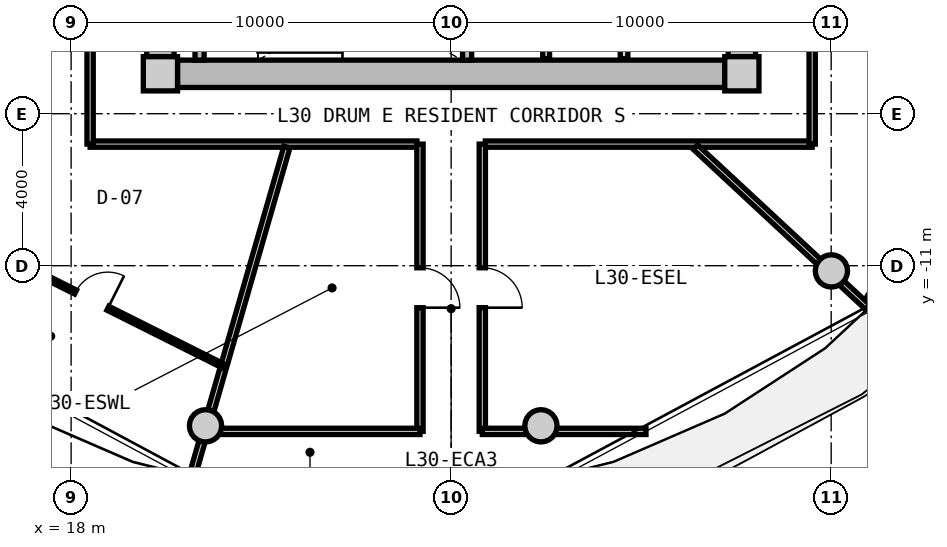
"""IFC4 building model, lengths in metres.
Left out: names, types, materials, properties, quantities, classifications, styles, units other than length and angle.
Written with IfcOpenShell. Run it as: python <this file> out.ifc"""

import sys

from ifc_helpers import new_model, si_unit, direction, frame, frame_2d, origin, origin_2d, place, context, subcontext, project, spatial, rectangle, circle, extrude, source, transform, mapped, element, fill, save


model = new_model("IFC4")
c1 = context("Model", 3, precision=1e-05, world=origin(), true_north=direction((0.0, 1.0)))
c2 = subcontext(c1, "Body", "Model", "MODEL_VIEW")
j1 = project(units=[si_unit("LENGTHUNIT", "METRE"), si_unit("PLANEANGLEUNIT", "RADIAN")], contexts=[c1])
p1 = place(None, origin())
s1 = spatial("IfcSite", under=j1, at=p1, CompositionType="ELEMENT")
p2 = place(p1, origin())
s2 = spatial("IfcBuilding", under=s1, at=p2, CompositionType="ELEMENT")
p3 = place(p2, frame((0.0, 0.0, 99.3)))
s3 = spatial("IfcBuildingStorey", under=s2, at=p3, CompositionType="ELEMENT", Elevation=99.3)
m1 = source(origin(), c2, "Body", "SweptSolid", [
    extrude(rectangle(XDim=0.9, YDim=0.9, at=origin_2d()), origin(), (0.0, 0.0, 1.0), 3.05),
])
for number, where, z_axis, x_axis in (
    (1, (20.35, -5.95, 0.0), (0.0, 0.0, 1.0), (1.0, 0.0, 0.0)),
    (2, (35.65, -5.95, 0.0), (0.0, 0.0, 1.0), (1.0, 0.0, 0.0)),
):
    element("IfcColumn", number, at=place(p3, frame(where, z_axis=z_axis, x_axis=x_axis)), inside=s3, PredefinedType="COLUMN", context=c2, shape_type="MappedRepresentation", body=[
        mapped(m1, transform((0.0, 0.0, 0.0), x_axis=(1.0, 0.0, 0.0), y_axis=(0.0, 1.0, 0.0), z_axis=(0.0, 0.0, 1.0), scale=1.0)),
    ])
m2 = source(origin(), c2, "Body", "SweptSolid", [
    extrude(rectangle(XDim=14.4, YDim=0.72, at=frame_2d((7.2, 0.0))), origin(), (0.0, 0.0, 1.0), 2.79),
])
p4 = place(p3, frame((35.2, -5.95, 0.0), z_axis=(0.0, 0.0, 1.0), x_axis=(-1.0, 0.0, 0.0)))
e3 = element("IfcWall", 3, at=p4, inside=s3, PredefinedType="SHEAR", context=c2, shape_type="MappedRepresentation", body=[
    mapped(m2, transform((0.0, 0.0, 0.0), x_axis=(1.0, 0.0, 0.0), y_axis=(0.0, 1.0, 0.0), z_axis=(0.0, 0.0, 1.0), scale=1.0)),
])
m3 = source(origin(), c2, "Body", "SweptSolid", [
    extrude(rectangle(XDim=11.0, YDim=0.72, at=frame_2d((5.5, 0.0))), origin(), (0.0, 0.0, 1.0), 2.79),
])
p5 = place(p3, frame((20.35, -5.5, 0.0), z_axis=(0.0, 0.0, 1.0), x_axis=(0.0, 1.0, 0.0)))
e4 = element("IfcWall", 4, at=p5, inside=s3, PredefinedType="SHEAR", context=c2, shape_type="MappedRepresentation", body=[
    mapped(m3, transform((0.0, 0.0, 0.0), x_axis=(1.0, 0.0, 0.0), y_axis=(0.0, 1.0, 0.0), z_axis=(0.0, 0.0, 1.0), scale=1.0)),
])
p6 = place(p5, frame((3.8, 0.0, 0.0)))
e5 = element("IfcOpeningElement", 5, at=p6, cuts=e4, PredefinedType="OPENING", context=c2, shape_type="SweptSolid", body=[
    extrude(rectangle(XDim=1.2, YDim=2.15, at=frame_2d((0.6, 1.075))), frame((0.0, 0.37, 0.0), z_axis=(0.0, -1.0, 0.0), x_axis=(1.0, 0.0, 0.0)), (0.0, 0.0, 1.0), 0.74),
])
p7 = place(p3, frame((35.65, 5.5, 0.0), z_axis=(0.0, 0.0, 1.0), x_axis=(0.0, -1.0, 0.0)))
e6 = element("IfcWall", 6, at=p7, inside=s3, PredefinedType="SHEAR", context=c2, shape_type="MappedRepresentation", body=[
    mapped(m3, transform((0.0, 0.0, 0.0), x_axis=(1.0, 0.0, 0.0), y_axis=(0.0, 1.0, 0.0), z_axis=(0.0, 0.0, 1.0), scale=1.0)),
])
p8 = place(p7, frame((5.65, 0.0, 0.0)))
e7 = element("IfcOpeningElement", 7, at=p8, cuts=e6, PredefinedType="OPENING", context=c2, shape_type="SweptSolid", body=[
    extrude(rectangle(XDim=1.2, YDim=2.15, at=frame_2d((0.6, 1.075))), frame((0.0, 0.37, 0.0), z_axis=(0.0, -1.0, 0.0), x_axis=(1.0, 0.0, 0.0)), (0.0, 0.0, 1.0), 0.74),
])
m4 = source(origin(), c2, "Body", "SweptSolid", [
    extrude(circle(Radius=0.425, at=origin_2d()), origin(), (0.0, 0.0, 1.0), 3.05),
])
for number, where, z_axis, x_axis in (
    (8, (21.537, -15.213, 0.0), (0.0, 0.0, 1.0), (1.0, 0.0, 0.0)),
    (9, (30.363, -15.213, 0.0), (0.0, 0.0, 1.0), (1.0, 0.0, 0.0)),
    (10, (38.006, -11.137, 0.0), (0.0, 0.0, 1.0), (1.0, 0.0, 0.0)),
):
    element("IfcColumn", number, at=place(p3, frame(where, z_axis=z_axis, x_axis=x_axis)), inside=s3, PredefinedType="COLUMN", context=c2, shape_type="MappedRepresentation", body=[
        mapped(m4, transform((0.0, 0.0, 0.0), x_axis=(1.0, 0.0, 0.0), y_axis=(0.0, 1.0, 0.0), z_axis=(0.0, 0.0, 1.0), scale=1.0)),
    ])
m5 = source(origin(), c2, "Body", "SweptSolid", [
    extrude(rectangle(XDim=9.014, YDim=0.29, at=frame_2d((4.507, 0.0))), origin(), (0.0, 0.0, 1.0), 2.79),
])
p9 = place(p3, frame((43.704, -4.421, 0.0), z_axis=(0.0, 0.0, 1.0), x_axis=(-0.527732945084, -0.849410347637, 0.0)))
e11 = element("IfcWall", 11, at=p9, inside=s3, PredefinedType="SOLIDWALL", context=c2, shape_type="MappedRepresentation", body=[
    mapped(m5, transform((0.0, 0.0, 0.0), x_axis=(1.0, 0.0, 0.0), y_axis=(0.0, 1.0, 0.0), z_axis=(0.0, 0.0, 1.0), scale=1.0)),
])
p10 = place(p9, frame((0.98, 0.0, 0.0)))
e12 = element("IfcOpeningElement", 12, at=p10, cuts=e11, PredefinedType="OPENING", context=c2, shape_type="SweptSolid", body=[
    extrude(rectangle(XDim=1.15, YDim=2.25, at=frame_2d((0.575, 1.125))), frame((0.0, 0.155, 0.0), z_axis=(0.0, -1.0, 0.0), x_axis=(1.0, 0.0, 0.0)), (0.0, 0.0, 1.0), 0.31),
])
p11 = place(p9, frame((4.857, 0.0, 0.85)))
e13 = element("IfcOpeningElement", 13, at=p11, cuts=e11, PredefinedType="OPENING", context=c2, shape_type="SweptSolid", body=[
    extrude(rectangle(XDim=1.2, YDim=1.5, at=frame_2d((0.6, 0.75))), frame((0.0, 0.155, 0.0), z_axis=(0.0, -1.0, 0.0), x_axis=(1.0, 0.0, 0.0)), (0.0, 0.0, 1.0), 0.31),
])
m6 = source(origin(), c2, "Body", "SweptSolid", [
    extrude(rectangle(XDim=3.14, YDim=0.24, at=frame_2d((1.57, 0.0))), origin(), (0.0, 0.0, 1.0), 2.79),
])
for number, where, z_axis, x_axis in (
    (14, (21.38, -5.59, 0.0), (0.0, 0.0, 1.0), (0.0, 1.0, 0.0)),
    (15, (28.42, -5.59, 0.0), (0.0, 0.0, 1.0), (0.0, 1.0, 0.0)),
):
    element("IfcWall", number, at=place(p3, frame(where, z_axis=z_axis, x_axis=x_axis)), inside=s3, PredefinedType="PARTITIONING", context=c2, shape_type="MappedRepresentation", body=[
        mapped(m6, transform((0.0, 0.0, 0.0), x_axis=(1.0, 0.0, 0.0), y_axis=(0.0, 1.0, 0.0), z_axis=(0.0, 0.0, 1.0), scale=1.0)),
    ])
m7 = source(origin(), c2, "Body", "SweptSolid", [
    extrude(rectangle(XDim=3.8, YDim=0.2, at=frame_2d((1.9, 0.0))), origin(), (0.0, 0.0, 1.0), 2.775),
])
p12 = place(p3, frame((32.55, -5.55, 0.0), z_axis=(0.0, 0.0, 1.0), x_axis=(0.0, 1.0, 0.0)))
e16 = element("IfcWall", 16, at=p12, inside=s3, PredefinedType="PARTITIONING", context=c2, shape_type="MappedRepresentation", body=[
    mapped(m7, transform((0.0, 0.0, 0.0), x_axis=(1.0, 0.0, 0.0), y_axis=(0.0, 1.0, 0.0), z_axis=(0.0, 0.0, 1.0), scale=1.0)),
])
m8 = source(origin(), c2, "Body", "SweptSolid", [
    extrude(rectangle(XDim=3.22, YDim=0.18, at=frame_2d((1.61, 0.0))), origin(), (0.0, 0.0, 1.0), 2.775),
])
p13 = place(p3, frame((30.5, -5.55, 0.0), z_axis=(0.0, 0.0, 1.0), x_axis=(0.0, 1.0, 0.0)))
e17 = element("IfcWall", 17, at=p13, inside=s3, PredefinedType="PARTITIONING", context=c2, shape_type="MappedRepresentation", body=[
    mapped(m8, transform((0.0, 0.0, 0.0), x_axis=(1.0, 0.0, 0.0), y_axis=(0.0, 1.0, 0.0), z_axis=(0.0, 0.0, 1.0), scale=1.0)),
])
m9 = source(origin(), c2, "Body", "SweptSolid", [
    extrude(rectangle(XDim=8.6, YDim=0.165, at=frame_2d((4.3, 0.0))), origin(), (0.0, 0.0, 1.0), 2.775),
])
for number, where, z_axis, x_axis in (
    (18, (37.5, -7.8, 0.0), (0.0, 0.0, 1.0), (-1.0, 0.0, 0.0)),
    (19, (27.1, -7.8, 0.0), (0.0, 0.0, 1.0), (-1.0, 0.0, 0.0)),
):
    element("IfcWall", number, at=place(p3, frame(where, z_axis=z_axis, x_axis=x_axis)), inside=s3, PredefinedType="PARTITIONING", context=c2, shape_type="MappedRepresentation", body=[
        mapped(m9, transform((0.0, 0.0, 0.0), x_axis=(1.0, 0.0, 0.0), y_axis=(0.0, 1.0, 0.0), z_axis=(0.0, 0.0, 1.0), scale=1.0)),
    ])
m10 = source(origin(), c2, "Body", "SweptSolid", [
    extrude(rectangle(XDim=15.6, YDim=0.165, at=frame_2d((7.8, 0.0))), origin(), (0.0, 0.0, 1.0), 2.775),
])
p14 = place(p3, frame((18.5, -7.8, 0.0), z_axis=(0.0, 0.0, 1.0), x_axis=(0.0, 1.0, 0.0)))
e20 = element("IfcWall", 20, at=p14, inside=s3, PredefinedType="PARTITIONING", context=c2, shape_type="MappedRepresentation", body=[
    mapped(m10, transform((0.0, 0.0, 0.0), x_axis=(1.0, 0.0, 0.0), y_axis=(0.0, 1.0, 0.0), z_axis=(0.0, 0.0, 1.0), scale=1.0)),
])
p15 = place(p14, frame((5.673, 0.0, 0.0)))
e21 = element("IfcOpeningElement", 21, at=p15, cuts=e20, PredefinedType="OPENING", context=c2, shape_type="SweptSolid", body=[
    extrude(rectangle(XDim=1.05, YDim=2.15, at=frame_2d((0.525, 1.075))), frame((0.0, 0.093, 0.0), z_axis=(0.0, -1.0, 0.0), x_axis=(1.0, 0.0, 0.0)), (0.0, 0.0, 1.0), 0.185),
])
p16 = place(p3, frame((37.5, 7.8, 0.0), z_axis=(0.0, 0.0, 1.0), x_axis=(0.0, -1.0, 0.0)))
e22 = element("IfcWall", 22, at=p16, inside=s3, PredefinedType="PARTITIONING", context=c2, shape_type="MappedRepresentation", body=[
    mapped(m10, transform((0.0, 0.0, 0.0), x_axis=(1.0, 0.0, 0.0), y_axis=(0.0, 1.0, 0.0), z_axis=(0.0, 0.0, 1.0), scale=1.0)),
])
p17 = place(p16, frame((9.482, 0.0, 0.0)))
e23 = element("IfcOpeningElement", 23, at=p17, cuts=e22, PredefinedType="OPENING", context=c2, shape_type="SweptSolid", body=[
    extrude(rectangle(XDim=1.25, YDim=2.2, at=frame_2d((0.625, 1.1))), frame((0.0, 0.093, 0.0), z_axis=(0.0, -1.0, 0.0), x_axis=(1.0, 0.0, 0.0)), (0.0, 0.0, 1.0), 0.185),
])
m11 = source(origin(), c2, "Body", "SweptSolid", [
    extrude(rectangle(XDim=8.989, YDim=0.165, at=frame_2d((4.495, 0.0))), origin(), (0.0, 0.0, 1.0), 2.275),
])
p18 = place(p3, frame((23.678, -7.88, 0.0), z_axis=(0.0, 0.0, 1.0), x_axis=(-0.27702323008, -0.960863221274, 0.0)))
e24 = element("IfcWall", 24, at=p18, inside=s3, PredefinedType="PARTITIONING", context=c2, shape_type="MappedRepresentation", body=[
    mapped(m11, transform((0.0, 0.0, 0.0), x_axis=(1.0, 0.0, 0.0), y_axis=(0.0, 1.0, 0.0), z_axis=(0.0, 0.0, 1.0), scale=1.0)),
])
m12 = source(origin(), c2, "Body", "SweptSolid", [
    extrude(rectangle(XDim=6.187, YDim=0.165, at=frame_2d((3.093, 0.0))), origin(), (0.0, 0.0, 1.0), 2.275),
])
p19 = place(p3, frame((34.429, -7.88, 0.0), z_axis=(0.0, 0.0, 1.0), x_axis=(0.732501077882, -0.680765870841, 0.0)))
e25 = element("IfcWall", 25, at=p19, inside=s3, PredefinedType="PARTITIONING", context=c2, shape_type="MappedRepresentation", body=[
    mapped(m12, transform((0.0, 0.0, 0.0), x_axis=(1.0, 0.0, 0.0), y_axis=(0.0, 1.0, 0.0), z_axis=(0.0, 0.0, 1.0), scale=1.0)),
])
m13 = source(origin(), c2, "Body", "SweptSolid", [
    extrude(rectangle(XDim=7.56, YDim=0.165, at=frame_2d((3.78, 0.0))), origin(), (0.0, 0.0, 1.0), 2.775),
])
p20 = place(p3, frame((27.18, -15.36, 0.0), z_axis=(0.0, 0.0, 1.0), x_axis=(0.0, 1.0, 0.0)))
e26 = element("IfcWall", 26, at=p20, inside=s3, PredefinedType="PARTITIONING", context=c2, shape_type="MappedRepresentation", body=[
    mapped(m13, transform((0.0, 0.0, 0.0), x_axis=(1.0, 0.0, 0.0), y_axis=(0.0, 1.0, 0.0), z_axis=(0.0, 0.0, 1.0), scale=1.0)),
])
p21 = place(p20, frame((3.255, 0.0, 0.0)))
e27 = element("IfcOpeningElement", 27, at=p21, cuts=e26, PredefinedType="OPENING", context=c2, shape_type="SweptSolid", body=[
    extrude(rectangle(XDim=1.05, YDim=2.15, at=frame_2d((0.525, 1.075))), frame((0.0, 0.093, 0.0), z_axis=(0.0, -1.0, 0.0), x_axis=(1.0, 0.0, 0.0)), (0.0, 0.0, 1.0), 0.185),
])
m14 = source(origin(), c2, "Body", "SweptSolid", [
    extrude(rectangle(XDim=5.814, YDim=0.165, at=frame_2d((2.907, 0.0))), origin(), (0.0, 0.0, 1.0), 2.275),
])
p22 = place(p3, frame((21.366, -15.36, 0.0), z_axis=(0.0, 0.0, 1.0), x_axis=(1.0, 0.0, 0.0)))
e28 = element("IfcWall", 28, at=p22, inside=s3, PredefinedType="PARTITIONING", context=c2, shape_type="MappedRepresentation", body=[
    mapped(m14, transform((0.0, 0.0, 0.0), x_axis=(1.0, 0.0, 0.0), y_axis=(0.0, 1.0, 0.0), z_axis=(0.0, 0.0, 1.0), scale=1.0)),
])
p23 = place(p3, frame((28.82, -15.36, 0.0), z_axis=(0.0, 0.0, 1.0), x_axis=(0.0, 1.0, 0.0)))
e29 = element("IfcWall", 29, at=p23, inside=s3, PredefinedType="PARTITIONING", context=c2, shape_type="MappedRepresentation", body=[
    mapped(m13, transform((0.0, 0.0, 0.0), x_axis=(1.0, 0.0, 0.0), y_axis=(0.0, 1.0, 0.0), z_axis=(0.0, 0.0, 1.0), scale=1.0)),
])
p24 = place(p23, frame((3.255, 0.0, 0.0)))
e30 = element("IfcOpeningElement", 30, at=p24, cuts=e29, PredefinedType="OPENING", context=c2, shape_type="SweptSolid", body=[
    extrude(rectangle(XDim=1.05, YDim=2.15, at=frame_2d((0.525, 1.075))), frame((0.0, 0.093, 0.0), z_axis=(0.0, -1.0, 0.0), x_axis=(1.0, 0.0, 0.0)), (0.0, 0.0, 1.0), 0.185),
])
m15 = source(origin(), c2, "Body", "SweptSolid", [
    extrude(rectangle(XDim=4.307, YDim=0.165, at=frame_2d((2.153, 0.0))), origin(), (0.0, 0.0, 1.0), 2.275),
])
p25 = place(p3, frame((28.82, -15.36, 0.0), z_axis=(0.0, 0.0, 1.0), x_axis=(1.0, 0.0, 0.0)))
e31 = element("IfcWall", 31, at=p25, inside=s3, PredefinedType="PARTITIONING", context=c2, shape_type="MappedRepresentation", body=[
    mapped(m15, transform((0.0, 0.0, 0.0), x_axis=(1.0, 0.0, 0.0), y_axis=(0.0, 1.0, 0.0), z_axis=(0.0, 0.0, 1.0), scale=1.0)),
])
m16 = source(origin(), c2, "Body", "SweptSolid", [
    extrude(rectangle(XDim=7.767, YDim=0.115, at=frame_2d((3.884, 0.0))), origin(), (0.0, 0.0, 1.0), 2.775),
])
p26 = place(p3, frame((15.07, -10.167, 0.0), z_axis=(0.0, 0.0, 1.0), x_axis=(0.894188177352, -0.447691303783, 0.0)))
e32 = element("IfcWall", 32, at=p26, inside=s3, PredefinedType="PARTITIONING", context=c2, shape_type="MappedRepresentation", body=[
    mapped(m16, transform((0.0, 0.0, 0.0), x_axis=(1.0, 0.0, 0.0), y_axis=(0.0, 1.0, 0.0), z_axis=(0.0, 0.0, 1.0), scale=1.0)),
])
p27 = place(p26, frame((3.409, 0.0, 0.0)))
e33 = element("IfcOpeningElement", 33, at=p27, cuts=e32, PredefinedType="OPENING", context=c2, shape_type="SweptSolid", body=[
    extrude(rectangle(XDim=0.95, YDim=2.1, at=frame_2d((0.475, 1.05))), frame((0.0, 0.067, 0.0), z_axis=(0.0, -1.0, 0.0), x_axis=(1.0, 0.0, 0.0)), (0.0, 0.0, 1.0), 0.135),
])
m17 = source(origin(), c2, "Body", "SweptSolid", [
    extrude(rectangle(XDim=1.05, YDim=2.15, at=frame_2d((0.525, 1.075))), frame((0.0, 0.025, 0.0), z_axis=(0.0, -1.0, 0.0), x_axis=(1.0, 0.0, 0.0)), (0.0, 0.0, 1.0), 0.05),
])
p28 = place(p21, frame((1.05, 0.0, 0.0), z_axis=(0.0, 0.0, 1.0), x_axis=(-1.0, 0.0, 0.0)))
e34 = element("IfcDoor", 34, at=p28, inside=s3, OperationType="SINGLE_SWING_RIGHT", PredefinedType="DOOR", context=c2, shape_type="MappedRepresentation", body=[
    mapped(m17, transform((0.0, 0.0, 0.0), x_axis=(1.0, 0.0, 0.0), y_axis=(0.0, 1.0, 0.0), z_axis=(0.0, 0.0, 1.0), scale=1.0)),
])
fill(e27, e34)
p29 = place(p24, frame((1.05, 0.0, 0.0), z_axis=(0.0, 0.0, 1.0), x_axis=(-1.0, 0.0, 0.0)))
e35 = element("IfcDoor", 35, at=p29, inside=s3, OperationType="SINGLE_SWING_RIGHT", PredefinedType="DOOR", context=c2, shape_type="MappedRepresentation", body=[
    mapped(m17, transform((0.0, 0.0, 0.0), x_axis=(1.0, 0.0, 0.0), y_axis=(0.0, 1.0, 0.0), z_axis=(0.0, 0.0, 1.0), scale=1.0)),
])
fill(e30, e35)
m18 = source(origin(), c2, "Body", "SweptSolid", [
    extrude(rectangle(XDim=0.95, YDim=2.1, at=frame_2d((0.475, 1.05))), frame((0.0, 0.025, 0.0), z_axis=(0.0, -1.0, 0.0), x_axis=(1.0, 0.0, 0.0)), (0.0, 0.0, 1.0), 0.05),
])
p30 = place(p27, origin())
e36 = element("IfcDoor", 36, at=p30, inside=s3, OperationType="SINGLE_SWING_RIGHT", PredefinedType="DOOR", context=c2, shape_type="MappedRepresentation", body=[
    mapped(m18, transform((0.0, 0.0, 0.0), x_axis=(1.0, 0.0, 0.0), y_axis=(0.0, 1.0, 0.0), z_axis=(0.0, 0.0, 1.0), scale=1.0)),
])
fill(e33, e36)
save(model, sys.argv[1])
